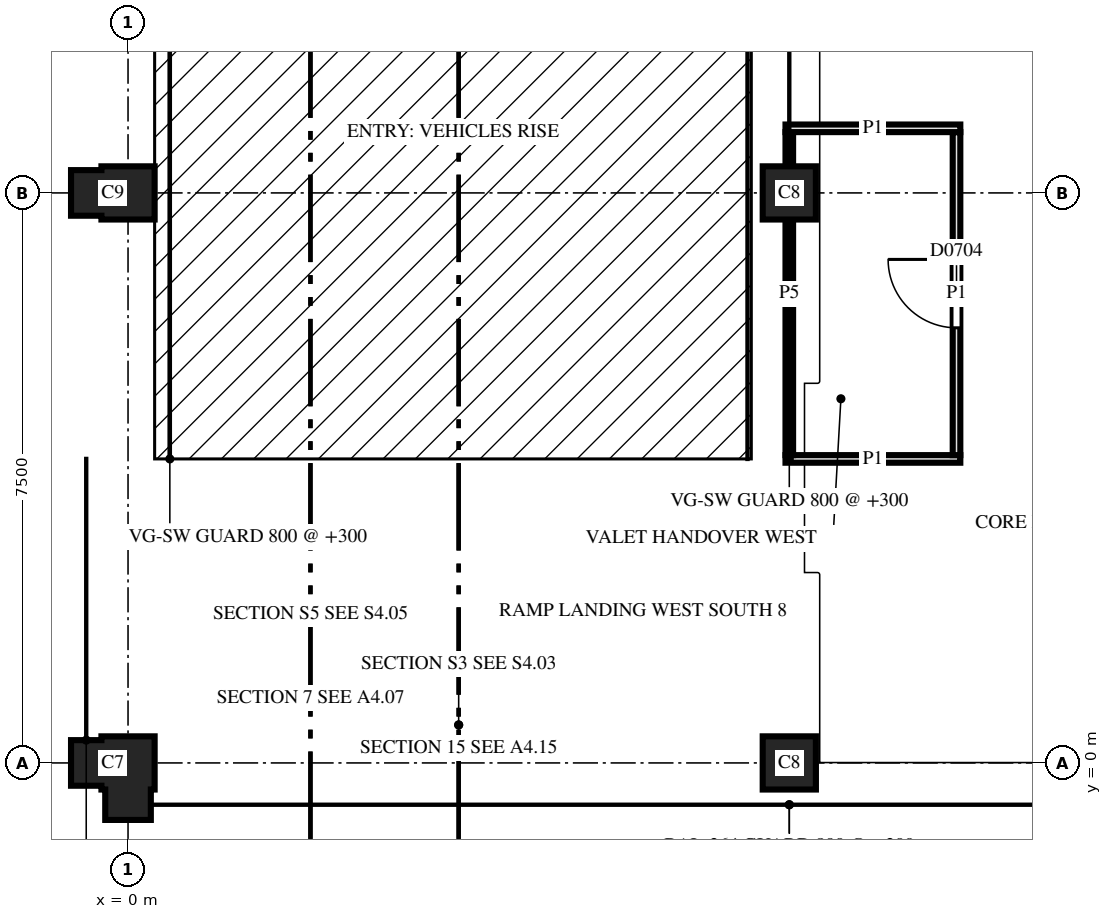
"""IFC4 building model, lengths in metres.
Left out: names, types, materials, properties, quantities, classifications, styles, units other than length and angle.
Written with IfcOpenShell. Run it as: python <this file> out.ifc"""

import sys

from ifc_helpers import new_model, si_unit, direction, frame, frame_2d, origin, place, context, subcontext, project, spatial, polyline, rectangle, outline, extrude, element, fill, save


model = new_model("IFC4")
c1 = context("Model", 3, precision=1e-05, world=origin(), true_north=direction((0.0, 1.0)))
c2 = subcontext(c1, "Body", "Model", "MODEL_VIEW")
j1 = project(units=[si_unit("LENGTHUNIT", "METRE"), si_unit("PLANEANGLEUNIT", "RADIAN")], contexts=[c1])
p1 = place(None, origin())
s1 = spatial("IfcSite", under=j1, at=p1, CompositionType="ELEMENT")
p2 = place(p1, origin())
s2 = spatial("IfcBuilding", under=s1, at=p2, CompositionType="ELEMENT")
p3 = place(p2, frame((0.0, 0.0, 26.7)))
s3 = spatial("IfcBuildingStorey", under=s2, at=p3, CompositionType="ELEMENT", Elevation=26.7)
p4 = place(p3, frame((0.0, 0.0, 0.0), z_axis=(0.0, 0.0, 1.0), x_axis=(-1.0, 0.0, 0.0)))
e1 = element("IfcColumn", 1, at=p4, inside=s3, PredefinedType="COLUMN", context=c2, shape_type="SweptSolid", body=[
    extrude(outline(polyline([(-0.35, -0.35), (0.35, -0.35), (0.35, -0.3), (0.75, -0.3), (0.75, 0.3), (0.35, 0.3), (0.35, 0.35), (0.3, 0.35), (0.3, 0.75), (-0.3, 0.75), (-0.3, 0.35), (-0.35, 0.35), (-0.35, -0.35)])), origin(), (0.0, 0.0, 1.0), 3.7),
])
p5 = place(p3, frame((8.7, 0.0, 0.0), z_axis=(0.0, 0.0, 1.0), x_axis=(1.0, 0.0, 0.0)))
e2 = element("IfcColumn", 2, at=p5, inside=s3, PredefinedType="COLUMN", context=c2, shape_type="SweptSolid", body=[
    extrude(outline(polyline([(-0.35, -0.35), (0.35, -0.35), (0.35, 0.35), (-0.35, 0.35), (-0.35, -0.35)])), origin(), (0.0, 0.0, 1.0), 3.7),
])
p6 = place(p3, frame((0.0, 7.5, 0.0), z_axis=(0.0, 0.0, 1.0), x_axis=(-1.0, 0.0, 0.0)))
e3 = element("IfcColumn", 3, at=p6, inside=s3, PredefinedType="COLUMN", context=c2, shape_type="SweptSolid", body=[
    extrude(outline(polyline([(-0.35, -0.35), (0.35, -0.35), (0.35, -0.3), (0.75, -0.3), (0.75, 0.3), (0.35, 0.3), (0.35, 0.35), (-0.35, 0.35), (-0.35, -0.35)])), origin(), (0.0, 0.0, 1.0), 3.7),
])
p7 = place(p3, frame((8.7, 7.5, 0.0), z_axis=(0.0, 0.0, 1.0), x_axis=(1.0, 0.0, 0.0)))
e4 = element("IfcColumn", 4, at=p7, inside=s3, PredefinedType="COLUMN", context=c2, shape_type="SweptSolid", body=[
    extrude(outline(polyline([(-0.35, -0.35), (0.35, -0.35), (0.35, 0.35), (-0.35, 0.35), (-0.35, -0.35)])), origin(), (0.0, 0.0, 1.0), 3.7),
])
p8 = place(p3, frame((8.65, 4.0, 0.0), z_axis=(0.0, 0.0, 1.0), x_axis=(1.0, 0.0, 0.0)))
e5 = element("IfcWall", 5, at=p8, inside=s3, PredefinedType="PARTITIONING", context=c2, shape_type="SweptSolid", body=[
    extrude(rectangle(XDim=2.3, YDim=0.1, at=frame_2d((1.15, 0.0))), origin(), (0.0, 0.0, 1.0), 2.88),
])
p9 = place(p3, frame((10.9, 4.05, 0.0), z_axis=(0.0, 0.0, 1.0), x_axis=(0.0, 1.0, 0.0)))
e6 = element("IfcWall", 6, at=p9, inside=s3, PredefinedType="PARTITIONING", context=c2, shape_type="SweptSolid", body=[
    extrude(rectangle(XDim=4.25, YDim=0.1, at=frame_2d((2.125, 0.0))), origin(), (0.0, 0.0, 1.0), 2.88),
])
p10 = place(p9, frame((1.675, 0.0, 0.0)))
e7 = element("IfcOpeningElement", 7, at=p10, cuts=e6, PredefinedType="OPENING", context=c2, shape_type="SweptSolid", body=[
    extrude(rectangle(XDim=0.9, YDim=2.1, at=frame_2d((0.45, 1.05))), frame((0.0, 0.06, 0.0), z_axis=(0.0, -1.0, 0.0), x_axis=(1.0, 0.0, 0.0)), (0.0, 0.0, 1.0), 0.12),
])
p11 = place(p3, frame((8.7, 8.3, 0.0), z_axis=(0.0, 0.0, 1.0), x_axis=(0.0, -1.0, 0.0)))
e8 = element("IfcWall", 8, at=p11, inside=s3, PredefinedType="PARTITIONING", context=c2, shape_type="SweptSolid", body=[
    extrude(rectangle(XDim=4.25, YDim=0.1, at=frame_2d((2.125, 0.0))), origin(), (0.0, 0.0, 1.0), 2.6),
])
p12 = place(p3, frame((10.95, 8.35, 0.0), z_axis=(0.0, 0.0, 1.0), x_axis=(-1.0, 0.0, 0.0)))
e9 = element("IfcWall", 9, at=p12, inside=s3, PredefinedType="PARTITIONING", context=c2, shape_type="SweptSolid", body=[
    extrude(rectangle(XDim=2.3, YDim=0.1, at=frame_2d((1.15, 0.0))), origin(), (0.0, 0.0, 1.0), 2.88),
])
p13 = place(p10, origin())
e10 = element("IfcDoor", 10, at=p13, inside=s3, OperationType="SINGLE_SWING_LEFT", PredefinedType="DOOR", context=c2, shape_type="SweptSolid", body=[
    extrude(rectangle(XDim=0.9, YDim=2.1, at=frame_2d((0.45, 1.05))), frame((0.0, 0.025, 0.0), z_axis=(0.0, -1.0, 0.0), x_axis=(1.0, 0.0, 0.0)), (0.0, 0.0, 1.0), 0.05),
])
fill(e7, e10)
save(model, sys.argv[1])
